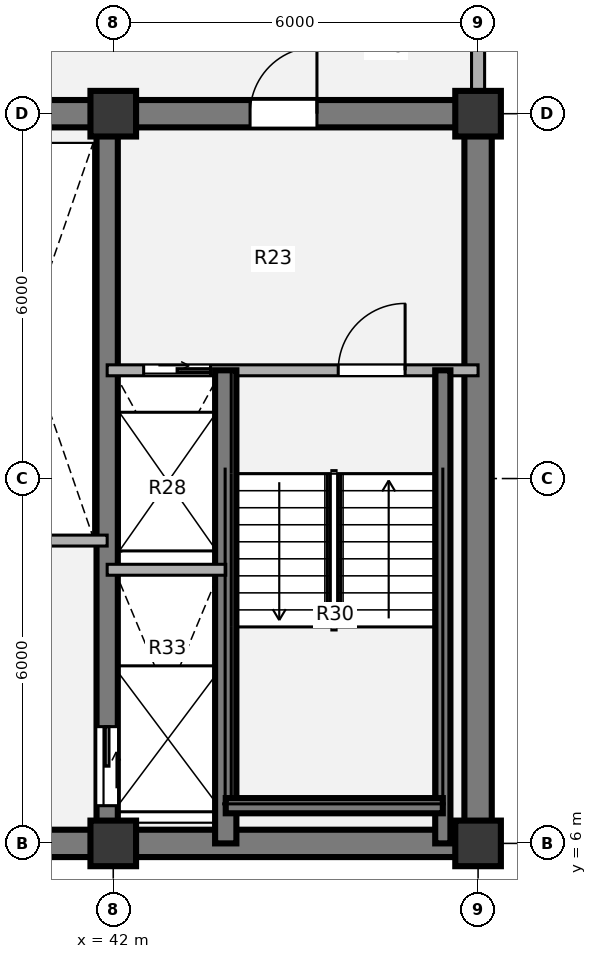
"""IFC4 building model, lengths in metres.
Left out: names, types, materials, properties, quantities, classifications, styles, units other than length and angle.
Written with IfcOpenShell. Run it as: python <this file> out.ifc"""

import sys

from ifc_helpers import new_model, si_unit, direction, frame, frame_2d, origin, origin_2d, place, context, subcontext, project, spatial, rectangle, extrude, source, transform, mapped, element, fill, save


model = new_model("IFC4")
c1 = context("Model", 3, precision=1e-05, world=origin(), true_north=direction((0.0, 1.0)))
c2 = subcontext(c1, "Body", "Model", "MODEL_VIEW")
j1 = project(units=[si_unit("LENGTHUNIT", "METRE"), si_unit("PLANEANGLEUNIT", "RADIAN")], contexts=[c1])
p1 = place(None, origin())
s1 = spatial("IfcSite", under=j1, at=p1, CompositionType="ELEMENT")
p2 = place(p1, origin())
s2 = spatial("IfcBuilding", under=s1, at=p2, CompositionType="ELEMENT")
p3 = place(p2, frame((0.0, 0.0, 179.1)))
s3 = spatial("IfcBuildingStorey", under=s2, at=p3, CompositionType="ELEMENT", Elevation=179.1)
m1 = source(origin(), c2, "Body", "SweptSolid", [
    extrude(rectangle(XDim=0.75, YDim=0.75, at=origin_2d()), origin(), (0.0, 0.0, 1.0), 3.78),
])
for number, where, z_axis, x_axis in (
    (1, (42.0, 6.0, 0.0), (0.0, 0.0, 1.0), (1.0, 0.0, 0.0)),
    (2, (48.0, 6.0, 0.0), (0.0, 0.0, 1.0), (1.0, 0.0, 0.0)),
    (3, (42.0, 18.0, 0.0), (0.0, 0.0, 1.0), (1.0, 0.0, 0.0)),
    (4, (48.0, 18.0, 0.0), (0.0, 0.0, 1.0), (1.0, 0.0, 0.0)),
):
    element("IfcColumn", number, at=place(p3, frame(where, z_axis=z_axis, x_axis=x_axis)), inside=s3, PredefinedType="COLUMN", context=c2, shape_type="MappedRepresentation", body=[
        mapped(m1, transform((0.0, 0.0, 0.0), x_axis=(1.0, 0.0, 0.0), y_axis=(0.0, 1.0, 0.0), z_axis=(0.0, 0.0, 1.0), scale=1.0)),
    ])
p4 = place(p3, frame((48.225, 6.0, 0.0), z_axis=(0.0, 0.0, 1.0), x_axis=(-1.0, 0.0, 0.0)))
e5 = element("IfcWall", 5, at=p4, inside=s3, PredefinedType="SHEAR", context=c2, shape_type="SweptSolid", body=[
    extrude(rectangle(XDim=24.45, YDim=0.45, at=frame_2d((12.225, 0.0))), origin(), (0.0, 0.0, 1.0), 3.78),
])
p5 = place(p3, frame((48.0, 18.0, 0.0), z_axis=(0.0, 0.0, 1.0), x_axis=(0.0, -1.0, 0.0)))
e6 = element("IfcWall", 6, at=p5, inside=s3, PredefinedType="SHEAR", context=c2, shape_type="SweptSolid", body=[
    extrude(rectangle(XDim=12.0, YDim=0.45, at=frame_2d((6.0, 0.0))), origin(), (0.0, 0.0, 1.0), 3.78),
])
p6 = place(p3, frame((38.8, 18.0, 0.0), z_axis=(0.0, 0.0, 1.0), x_axis=(1.0, 0.0, 0.0)))
e7 = element("IfcWall", 7, at=p6, inside=s3, PredefinedType="SHEAR", context=c2, shape_type="SweptSolid", body=[
    extrude(rectangle(XDim=9.425, YDim=0.45, at=frame_2d((4.712, 0.0))), origin(), (0.0, 0.0, 1.0), 3.78),
])
p7 = place(p6, frame((5.45, 0.0, 0.0)))
e8 = element("IfcOpeningElement", 8, at=p7, cuts=e7, PredefinedType="OPENING", context=c2, shape_type="SweptSolid", body=[
    extrude(rectangle(XDim=1.1, YDim=2.1, at=origin_2d()), frame((0.55, 0.235, 1.05), z_axis=(0.0, -1.0, 0.0), x_axis=(1.0, 0.0, 0.0)), (0.0, 0.0, 1.0), 0.47),
])
p8 = place(p3, frame((41.9, 18.0, 0.0), z_axis=(0.0, 0.0, 1.0), x_axis=(0.0, -1.0, 0.0)))
e9 = element("IfcWall", 9, at=p8, inside=s3, PredefinedType="SHEAR", context=c2, shape_type="SweptSolid", body=[
    extrude(rectangle(XDim=12.0, YDim=0.35, at=frame_2d((6.0, 0.0))), origin(), (0.0, 0.0, 1.0), 3.78),
])
p9 = place(p8, frame((10.08, 0.0, 0.0)))
e10 = element("IfcOpeningElement", 10, at=p9, cuts=e9, PredefinedType="OPENING", context=c2, shape_type="SweptSolid", body=[
    extrude(rectangle(XDim=1.3, YDim=2.1, at=origin_2d()), frame((0.65, 0.185, 1.05), z_axis=(0.0, -1.0, 0.0), x_axis=(1.0, 0.0, 0.0)), (0.0, 0.0, 1.0), 0.37),
])
p10 = place(p3, frame((48.0, 21.05, 0.0), z_axis=(0.0, 0.0, 1.0), x_axis=(0.0, -1.0, 0.0)))
e11 = element("IfcWall", 11, at=p10, inside=s3, PredefinedType="SOLIDWALL", context=c2, shape_type="SweptSolid", body=[
    extrude(rectangle(XDim=2.695, YDim=0.215, at=frame_2d((1.348, 0.0))), origin(), (0.0, 0.0, 1.0), 2.718),
])
p11 = place(p3, frame((39.35, 10.98, 0.0), z_axis=(0.0, 0.0, 1.0), x_axis=(1.0, 0.0, 0.0)))
e12 = element("IfcWall", 12, at=p11, inside=s3, PredefinedType="PARTITIONING", context=c2, shape_type="SweptSolid", body=[
    extrude(rectangle(XDim=2.55, YDim=0.18, at=frame_2d((1.275, 0.0))), origin(), (0.0, 0.0, 1.0), 3.5),
])
p12 = place(p3, frame((41.9, 13.78, 0.0), z_axis=(0.0, 0.0, 1.0), x_axis=(1.0, 0.0, 0.0)))
e13 = element("IfcWall", 13, at=p12, inside=s3, PredefinedType="PARTITIONING", context=c2, shape_type="SweptSolid", body=[
    extrude(rectangle(XDim=6.1, YDim=0.18, at=frame_2d((3.05, 0.0))), origin(), (0.0, 0.0, 1.0), 3.5),
])
p13 = place(p12, frame((0.6, 0.0, 0.0)))
e14 = element("IfcOpeningElement", 14, at=p13, cuts=e13, PredefinedType="OPENING", context=c2, shape_type="SweptSolid", body=[
    extrude(rectangle(XDim=1.1, YDim=2.1, at=origin_2d()), frame((0.55, 0.1, 1.05), z_axis=(0.0, -1.0, 0.0), x_axis=(1.0, 0.0, 0.0)), (0.0, 0.0, 1.0), 0.2),
])
p14 = place(p12, frame((3.8, 0.0, 0.0)))
e15 = element("IfcOpeningElement", 15, at=p14, cuts=e13, PredefinedType="OPENING", context=c2, shape_type="SweptSolid", body=[
    extrude(rectangle(XDim=1.1, YDim=2.1, at=origin_2d()), frame((0.55, 0.1, 1.05), z_axis=(0.0, -1.0, 0.0), x_axis=(1.0, 0.0, 0.0)), (0.0, 0.0, 1.0), 0.2),
])
p15 = place(p3, frame((43.85, 6.0, 0.0), z_axis=(0.0, 0.0, 1.0), x_axis=(0.0, 1.0, 0.0)))
e16 = element("IfcWall", 16, at=p15, inside=s3, PredefinedType="SHEAR", context=c2, shape_type="SweptSolid", body=[
    extrude(rectangle(XDim=7.78, YDim=0.35, at=frame_2d((3.89, 0.0))), origin(), (0.0, 0.0, 1.0), 3.85),
])
p16 = place(p3, frame((47.42, 6.0, 0.0), z_axis=(0.0, 0.0, 1.0), x_axis=(0.0, 1.0, 0.0)))
e17 = element("IfcWall", 17, at=p16, inside=s3, PredefinedType="SHEAR", context=c2, shape_type="SweptSolid", body=[
    extrude(rectangle(XDim=7.78, YDim=0.25, at=frame_2d((3.89, 0.0))), origin(), (0.0, 0.0, 1.0), 3.85),
])
p17 = place(p3, frame((43.85, 6.62, 0.0), z_axis=(0.0, 0.0, 1.0), x_axis=(1.0, 0.0, 0.0)))
e18 = element("IfcWall", 18, at=p17, inside=s3, PredefinedType="SHEAR", context=c2, shape_type="SweptSolid", body=[
    extrude(rectangle(XDim=3.57, YDim=0.25, at=frame_2d((1.785, 0.0))), origin(), (0.0, 0.0, 1.0), 3.85),
])
p18 = place(p3, frame((41.9, 10.5, 0.0), z_axis=(0.0, 0.0, 1.0), x_axis=(1.0, 0.0, 0.0)))
e19 = element("IfcWall", 19, at=p18, inside=s3, PredefinedType="PARTITIONING", context=c2, shape_type="SweptSolid", body=[
    extrude(rectangle(XDim=1.95, YDim=0.18, at=frame_2d((0.975, 0.0))), origin(), (0.0, 0.0, 1.0), 3.5),
])
m2 = source(origin(), c2, "Body", "SweptSolid", [
    extrude(rectangle(XDim=1.1, YDim=2.1, at=origin_2d()), frame((0.55, 0.025, 1.05), z_axis=(0.0, -1.0, 0.0), x_axis=(1.0, 0.0, 0.0)), (0.0, 0.0, 1.0), 0.05),
])
p19 = place(p13, origin())
e20 = element("IfcDoor", 20, at=p19, inside=s3, OperationType="SLIDING_TO_RIGHT", PredefinedType="DOOR", context=c2, shape_type="MappedRepresentation", body=[
    mapped(m2, transform((0.0, 0.0, 0.0), x_axis=(1.0, 0.0, 0.0), y_axis=(0.0, 1.0, 0.0), z_axis=(0.0, 0.0, 1.0), scale=1.0)),
])
fill(e14, e20)
m3 = source(origin(), c2, "Body", "SweptSolid", [
    extrude(rectangle(XDim=1.1, YDim=2.1, at=origin_2d()), frame((0.55, 0.025, 1.05), z_axis=(0.0, -1.0, 0.0), x_axis=(1.0, 0.0, 0.0)), (0.0, 0.0, 1.0), 0.05),
])
p20 = place(p14, origin())
e21 = element("IfcDoor", 21, at=p20, inside=s3, OperationType="SINGLE_SWING_RIGHT", PredefinedType="DOOR", context=c2, shape_type="MappedRepresentation", body=[
    mapped(m3, transform((0.0, 0.0, 0.0), x_axis=(1.0, 0.0, 0.0), y_axis=(0.0, 1.0, 0.0), z_axis=(0.0, 0.0, 1.0), scale=1.0)),
])
fill(e15, e21)
m4 = source(origin(), c2, "Body", "SweptSolid", [
    extrude(rectangle(XDim=1.3, YDim=2.1, at=origin_2d()), frame((0.65, 0.025, 1.05), z_axis=(0.0, -1.0, 0.0), x_axis=(1.0, 0.0, 0.0)), (0.0, 0.0, 1.0), 0.05),
])
p21 = place(p9, origin())
e22 = element("IfcDoor", 22, at=p21, inside=s3, OperationType="SLIDING_TO_LEFT", PredefinedType="DOOR", context=c2, shape_type="MappedRepresentation", body=[
    mapped(m4, transform((0.0, 0.0, 0.0), x_axis=(1.0, 0.0, 0.0), y_axis=(0.0, 1.0, 0.0), z_axis=(0.0, 0.0, 1.0), scale=1.0)),
])
fill(e10, e22)
m5 = source(origin(), c2, "Body", "SweptSolid", [
    extrude(rectangle(XDim=1.1, YDim=2.1, at=origin_2d()), frame((0.55, 0.025, 1.05), z_axis=(0.0, -1.0, 0.0), x_axis=(1.0, 0.0, 0.0)), (0.0, 0.0, 1.0), 0.05),
])
p22 = place(p7, origin())
e23 = element("IfcDoor", 23, at=p22, inside=s3, OperationType="SINGLE_SWING_RIGHT", PredefinedType="DOOR", context=c2, shape_type="MappedRepresentation", body=[
    mapped(m5, transform((0.0, 0.0, 0.0), x_axis=(1.0, 0.0, 0.0), y_axis=(0.0, 1.0, 0.0), z_axis=(0.0, 0.0, 1.0), scale=1.0)),
])
fill(e8, e23)
save(model, sys.argv[1])
